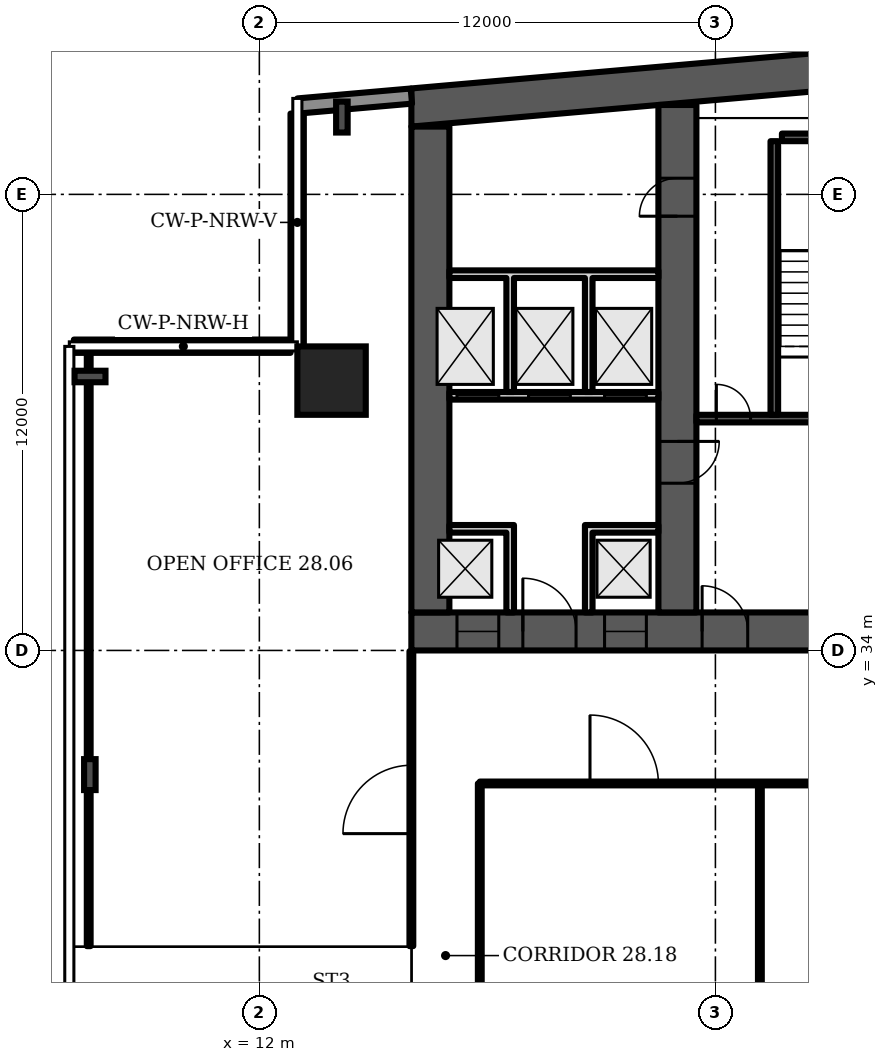
"""IFC4 building model, lengths in metres.
Left out: names, types, materials, properties, quantities, classifications, styles, units other than length and angle.
Written with IfcOpenShell. Run it as: python <this file> out.ifc"""

import sys

from ifc_helpers import new_model, si_unit, direction, frame, frame_2d, origin, origin_2d, place, context, subcontext, project, spatial, polyline, rectangle, i_section, outline, extrude, element, fill, save


model = new_model("IFC4")
c1 = context("Model", 3, precision=1e-05, world=origin(), true_north=direction((0.0, 1.0)))
c2 = subcontext(c1, "Body", "Model", "MODEL_VIEW")
j1 = project(units=[si_unit("LENGTHUNIT", "METRE"), si_unit("PLANEANGLEUNIT", "RADIAN")], contexts=[c1])
p1 = place(None, origin())
s1 = spatial("IfcSite", under=j1, at=p1, CompositionType="ELEMENT")
p2 = place(p1, origin())
s2 = spatial("IfcBuilding", under=s1, at=p2, CompositionType="ELEMENT")
p3 = place(p2, frame((0.0, 0.0, 121.9)))
s3 = spatial("IfcBuildingStorey", under=s2, at=p3, CompositionType="ELEMENT", Elevation=121.9)
p4 = place(p3, origin())
e1 = element("IfcWall", 1, at=p4, inside=s3, PredefinedType="SHEAR", context=c2, shape_type="SweptSolid", body=[
    extrude(outline(polyline([(16.0, 47.784), (40.5, 49.927), (65.0, 47.784), (65.0, 48.787), (40.5, 50.931), (16.0, 48.787), (16.0, 47.784)])), origin(), (0.0, 0.0, 1.0), 3.6),
])
p5 = place(p3, frame((16.0, 34.5, 0.0), z_axis=(0.0, 0.0, 1.0), x_axis=(1.0, 0.0, 0.0)))
e2 = element("IfcWall", 2, at=p5, inside=s3, PredefinedType="SHEAR", context=c2, shape_type="SweptSolid", body=[
    extrude(rectangle(XDim=49.0, YDim=1.0, at=frame_2d((24.5, 0.0))), origin(), (0.0, 0.0, 1.0), 3.6),
])
p6 = place(p5, frame((1.2, 0.0, 0.0)))
e3 = element("IfcOpeningElement", 3, at=p6, cuts=e2, PredefinedType="OPENING", context=c2, shape_type="SweptSolid", body=[
    extrude(rectangle(XDim=1.1, YDim=2.1, at=frame_2d((0.55, 1.05))), frame((0.0, 0.51, 0.0), z_axis=(0.0, -1.0, 0.0), x_axis=(1.0, 0.0, 0.0)), (0.0, 0.0, 1.0), 1.02),
])
p7 = place(p5, frame((5.083, 0.0, 0.0)))
e4 = element("IfcOpeningElement", 4, at=p7, cuts=e2, PredefinedType="OPENING", context=c2, shape_type="SweptSolid", body=[
    extrude(rectangle(XDim=1.1, YDim=2.1, at=frame_2d((0.55, 1.05))), frame((0.0, 0.51, 0.0), z_axis=(0.0, -1.0, 0.0), x_axis=(1.0, 0.0, 0.0)), (0.0, 0.0, 1.0), 1.02),
])
p8 = place(p5, frame((2.933, 0.0, 0.0)))
e5 = element("IfcOpeningElement", 5, at=p8, cuts=e2, PredefinedType="OPENING", context=c2, shape_type="SweptSolid", body=[
    extrude(rectangle(XDim=1.4, YDim=2.1, at=frame_2d((0.7, 1.05))), frame((0.0, 0.51, 0.0), z_axis=(0.0, -1.0, 0.0), x_axis=(1.0, 0.0, 0.0)), (0.0, 0.0, 1.0), 1.02),
])
p9 = place(p5, frame((7.65, 0.0, 0.0)))
e6 = element("IfcOpeningElement", 6, at=p9, cuts=e2, PredefinedType="OPENING", context=c2, shape_type="SweptSolid", body=[
    extrude(rectangle(XDim=1.2, YDim=2.1, at=frame_2d((0.6, 1.05))), frame((0.0, 0.51, 0.0), z_axis=(0.0, -1.0, 0.0), x_axis=(1.0, 0.0, 0.0)), (0.0, 0.0, 1.0), 1.02),
])
p10 = place(p5, frame((14.817, 0.0, 0.0)))
e7 = element("IfcOpeningElement", 7, at=p10, cuts=e2, PredefinedType="OPENING", context=c2, shape_type="SweptSolid", body=[
    extrude(rectangle(XDim=1.1, YDim=2.1, at=frame_2d((0.55, 1.05))), frame((0.0, 0.51, 0.0), z_axis=(0.0, -1.0, 0.0), x_axis=(1.0, 0.0, 0.0)), (0.0, 0.0, 1.0), 1.02),
])
p11 = place(p5, frame((19.083, 0.0, 0.0)))
e8 = element("IfcOpeningElement", 8, at=p11, cuts=e2, PredefinedType="OPENING", context=c2, shape_type="SweptSolid", body=[
    extrude(rectangle(XDim=1.1, YDim=2.1, at=frame_2d((0.55, 1.05))), frame((0.0, 0.51, 0.0), z_axis=(0.0, -1.0, 0.0), x_axis=(1.0, 0.0, 0.0)), (0.0, 0.0, 1.0), 1.02),
])
p12 = place(p5, frame((16.8, 0.0, 0.0)))
e9 = element("IfcOpeningElement", 9, at=p12, cuts=e2, PredefinedType="OPENING", context=c2, shape_type="SweptSolid", body=[
    extrude(rectangle(XDim=1.4, YDim=2.1, at=frame_2d((0.7, 1.05))), frame((0.0, 0.51, 0.0), z_axis=(0.0, -1.0, 0.0), x_axis=(1.0, 0.0, 0.0)), (0.0, 0.0, 1.0), 1.02),
])
p13 = place(p5, frame((21.817, 0.0, 0.0)))
e10 = element("IfcOpeningElement", 10, at=p13, cuts=e2, PredefinedType="OPENING", context=c2, shape_type="SweptSolid", body=[
    extrude(rectangle(XDim=1.1, YDim=2.1, at=frame_2d((0.55, 1.05))), frame((0.0, 0.51, 0.0), z_axis=(0.0, -1.0, 0.0), x_axis=(1.0, 0.0, 0.0)), (0.0, 0.0, 1.0), 1.02),
])
p14 = place(p5, frame((26.083, 0.0, 0.0)))
e11 = element("IfcOpeningElement", 11, at=p14, cuts=e2, PredefinedType="OPENING", context=c2, shape_type="SweptSolid", body=[
    extrude(rectangle(XDim=1.1, YDim=2.1, at=frame_2d((0.55, 1.05))), frame((0.0, 0.51, 0.0), z_axis=(0.0, -1.0, 0.0), x_axis=(1.0, 0.0, 0.0)), (0.0, 0.0, 1.0), 1.02),
])
p15 = place(p5, frame((33.15, 0.0, 0.0)))
e12 = element("IfcOpeningElement", 12, at=p15, cuts=e2, PredefinedType="OPENING", context=c2, shape_type="SweptSolid", body=[
    extrude(rectangle(XDim=1.2, YDim=2.1, at=frame_2d((0.6, 1.05))), frame((0.0, 0.51, 0.0), z_axis=(0.0, -1.0, 0.0), x_axis=(1.0, 0.0, 0.0)), (0.0, 0.0, 1.0), 1.02),
])
p16 = place(p5, frame((37.8, 0.0, 0.0)))
e13 = element("IfcOpeningElement", 13, at=p16, cuts=e2, PredefinedType="OPENING", context=c2, shape_type="SweptSolid", body=[
    extrude(rectangle(XDim=1.4, YDim=2.1, at=frame_2d((0.7, 1.05))), frame((0.0, 0.51, 0.0), z_axis=(0.0, -1.0, 0.0), x_axis=(1.0, 0.0, 0.0)), (0.0, 0.0, 1.0), 1.02),
])
p17 = place(p5, frame((42.817, 0.0, 0.0)))
e14 = element("IfcOpeningElement", 14, at=p17, cuts=e2, PredefinedType="OPENING", context=c2, shape_type="SweptSolid", body=[
    extrude(rectangle(XDim=1.1, YDim=2.1, at=frame_2d((0.55, 1.05))), frame((0.0, 0.51, 0.0), z_axis=(0.0, -1.0, 0.0), x_axis=(1.0, 0.0, 0.0)), (0.0, 0.0, 1.0), 1.02),
])
p18 = place(p5, frame((46.7, 0.0, 0.0)))
e15 = element("IfcOpeningElement", 15, at=p18, cuts=e2, PredefinedType="OPENING", context=c2, shape_type="SweptSolid", body=[
    extrude(rectangle(XDim=1.1, YDim=2.1, at=frame_2d((0.55, 1.05))), frame((0.0, 0.51, 0.0), z_axis=(0.0, -1.0, 0.0), x_axis=(1.0, 0.0, 0.0)), (0.0, 0.0, 1.0), 1.02),
])
p19 = place(p5, frame((44.667, 0.0, 0.0)))
e16 = element("IfcOpeningElement", 16, at=p19, cuts=e2, PredefinedType="OPENING", context=c2, shape_type="SweptSolid", body=[
    extrude(rectangle(XDim=1.4, YDim=2.1, at=frame_2d((0.7, 1.05))), frame((0.0, 0.51, 0.0), z_axis=(0.0, -1.0, 0.0), x_axis=(1.0, 0.0, 0.0)), (0.0, 0.0, 1.0), 1.02),
])
p20 = place(p3, frame((16.5, 35.0, 0.0), z_axis=(0.0, 0.0, 1.0), x_axis=(0.0, 1.0, 0.0)))
e17 = element("IfcWall", 17, at=p20, inside=s3, PredefinedType="SHEAR", context=c2, shape_type="SweptSolid", body=[
    extrude(rectangle(XDim=12.784, YDim=1.0, at=frame_2d((6.392, 0.0))), origin(), (0.0, 0.0, 1.0), 3.6),
])
p21 = place(p3, frame((23.0, 35.0, 0.0), z_axis=(0.0, 0.0, 1.0), x_axis=(0.0, 1.0, 0.0)))
e18 = element("IfcWall", 18, at=p21, inside=s3, PredefinedType="SHEAR", context=c2, shape_type="SweptSolid", body=[
    extrude(rectangle(XDim=13.352, YDim=1.0, at=frame_2d((6.676, 0.0))), origin(), (0.0, 0.0, 1.0), 3.6),
])
p22 = place(p21, frame((10.426, 0.0, 0.0)))
e19 = element("IfcOpeningElement", 19, at=p22, cuts=e18, PredefinedType="OPENING", context=c2, shape_type="SweptSolid", body=[
    extrude(rectangle(XDim=1.0, YDim=2.1, at=frame_2d((0.5, 1.05))), frame((0.0, 0.51, 0.0), z_axis=(0.0, -1.0, 0.0), x_axis=(1.0, 0.0, 0.0)), (0.0, 0.0, 1.0), 1.02),
])
p23 = place(p21, frame((3.4, 0.0, 0.0)))
e20 = element("IfcOpeningElement", 20, at=p23, cuts=e18, PredefinedType="OPENING", context=c2, shape_type="SweptSolid", body=[
    extrude(rectangle(XDim=1.1, YDim=2.1, at=frame_2d((0.55, 1.05))), frame((0.0, 0.51, 0.0), z_axis=(0.0, -1.0, 0.0), x_axis=(1.0, 0.0, 0.0)), (0.0, 0.0, 1.0), 1.02),
])
p24 = place(p3, frame((13.9, 41.1, 0.0), z_axis=(0.0, 0.0, 1.0), x_axis=(1.0, 0.0, 0.0)))
e21 = element("IfcColumn", 21, at=p24, inside=s3, PredefinedType="COLUMN", context=c2, shape_type="SweptSolid", body=[
    extrude(rectangle(XDim=1.8, YDim=1.8, at=origin_2d()), origin(), (0.0, 0.0, 1.0), 3.6),
])
for number, where, z_axis, x_axis in (
    (22, (14.172, 48.034, 0.0), (0.0, 0.0, 1.0), (-1.0, 0.0, 0.0)),
    (23, (7.544, 41.208, 0.0), (0.0, 0.0, 1.0), (0.0, 1.0, 0.0)),
    (24, (7.54, 30.733, 0.0), (0.0, 0.0, 1.0), (-1.0, 0.0, 0.0)),
):
    element("IfcColumn", number, at=place(p3, frame(where, z_axis=z_axis, x_axis=x_axis)), inside=s3, PredefinedType="COLUMN", context=c2, shape_type="SweptSolid", body=[
        extrude(i_section(OverallWidth=0.303, OverallDepth=0.814, WebThickness=0.021, FlangeThickness=0.04, FilletRadius=0.03, at=origin_2d()), origin(), (0.0, 0.0, 1.0), 3.6),
    ])
p25 = place(p3, frame((16.0, 48.587, 0.0), z_axis=(0.0, 0.0, 1.0), x_axis=(-0.996194, -0.087168, 0.0)))
e25 = element("IfcWall", 25, at=p25, inside=s3, PredefinedType="SOLIDWALL", context=c2, shape_type="SweptSolid", body=[
    extrude(rectangle(XDim=2.994, YDim=0.4, at=frame_2d((1.497, 0.0))), origin(), (0.0, 0.0, 1.0), 3.2),
])
p26 = place(p3, frame((12.995, 48.126, 0.0), z_axis=(0.0, 0.0, 1.0), x_axis=(0.0, -1.0, 0.0)))
e26 = element("IfcWall", 26, at=p26, inside=s3, PredefinedType="SOLIDWALL", context=c2, shape_type="SweptSolid", body=[
    extrude(rectangle(XDim=6.126, YDim=0.35, at=frame_2d((3.063, 0.0))), origin(), (0.0, 0.0, 1.0), 1.0),
])
p27 = place(p3, frame((12.82, 42.005, 0.0), z_axis=(0.0, 0.0, 1.0), x_axis=(-1.0, 0.0, 0.0)))
e27 = element("IfcWall", 27, at=p27, inside=s3, PredefinedType="SOLIDWALL", context=c2, shape_type="SweptSolid", body=[
    extrude(rectangle(XDim=5.7, YDim=0.35, at=frame_2d((2.85, 0.0))), origin(), (0.0, 0.0, 1.0), 1.0),
])
p28 = place(p3, frame((17.0, 40.7, 0.0), z_axis=(0.0, 0.0, 1.0), x_axis=(1.0, 0.0, 0.0)))
e28 = element("IfcWall", 28, at=p28, inside=s3, PredefinedType="PARTITIONING", context=c2, shape_type="SweptSolid", body=[
    extrude(rectangle(XDim=5.5, YDim=0.2, at=frame_2d((2.75, 0.0))), origin(), (0.0, 0.0, 1.0), 3.2),
])
p29 = place(p28, frame((0.2, 0.0, 0.0)))
e29 = element("IfcOpeningElement", 29, at=p29, cuts=e28, PredefinedType="OPENING", context=c2, shape_type="SweptSolid", body=[
    extrude(rectangle(XDim=1.1, YDim=2.1, at=frame_2d((0.55, 1.05))), frame((0.0, 0.11, 0.0), z_axis=(0.0, -1.0, 0.0), x_axis=(1.0, 0.0, 0.0)), (0.0, 0.0, 1.0), 0.22),
])
p30 = place(p28, frame((2.083, 0.0, 0.0)))
e30 = element("IfcOpeningElement", 30, at=p30, cuts=e28, PredefinedType="OPENING", context=c2, shape_type="SweptSolid", body=[
    extrude(rectangle(XDim=1.1, YDim=2.1, at=frame_2d((0.55, 1.05))), frame((0.0, 0.11, 0.0), z_axis=(0.0, -1.0, 0.0), x_axis=(1.0, 0.0, 0.0)), (0.0, 0.0, 1.0), 0.22),
])
p31 = place(p28, frame((4.083, 0.0, 0.0)))
e31 = element("IfcOpeningElement", 31, at=p31, cuts=e28, PredefinedType="OPENING", context=c2, shape_type="SweptSolid", body=[
    extrude(rectangle(XDim=1.1, YDim=2.1, at=frame_2d((0.55, 1.05))), frame((0.0, 0.11, 0.0), z_axis=(0.0, -1.0, 0.0), x_axis=(1.0, 0.0, 0.0)), (0.0, 0.0, 1.0), 0.22),
])
p32 = place(p3, origin())
e32 = element("IfcWall", 32, at=p32, inside=s3, PredefinedType="PARTITIONING", context=c2, shape_type="SweptSolid", body=[
    extrude(outline(polyline([(18.5, 37.1), (17.0, 37.1), (17.0, 37.3), (18.5, 37.3), (18.7, 37.3), (18.7, 35.0), (18.5, 35.0), (18.5, 37.1)])), origin(), (0.0, 0.0, 1.0), 3.2),
])
p33 = place(p3, origin())
e33 = element("IfcWall", 33, at=p33, inside=s3, PredefinedType="PARTITIONING", context=c2, shape_type="SweptSolid", body=[
    extrude(outline(polyline([(20.567, 37.3), (20.767, 37.3), (22.5, 37.3), (22.5, 37.1), (20.767, 37.1), (20.767, 35.0), (20.567, 35.0), (20.567, 37.3)])), origin(), (0.0, 0.0, 1.0), 3.2),
])
p34 = place(p3, origin())
e34 = element("IfcWall", 34, at=p34, inside=s3, PredefinedType="PARTITIONING", context=c2, shape_type="SweptSolid", body=[
    extrude(outline(polyline([(18.7, 40.8), (18.5, 40.8), (18.5, 43.8), (17.0, 43.8), (17.0, 44.0), (22.5, 44.0), (22.5, 43.8), (20.767, 43.8), (20.767, 40.8), (20.567, 40.8), (20.567, 43.8), (18.7, 43.8), (18.7, 40.8)])), origin(), (0.0, 0.0, 1.0), 3.2),
])
p35 = place(p3, frame((23.5, 40.1, 0.0), z_axis=(0.0, 0.0, 1.0), x_axis=(1.0, 0.0, 0.0)))
e35 = element("IfcWall", 35, at=p35, inside=s3, PredefinedType="SHEAR", context=c2, shape_type="SweptSolid", body=[
    extrude(rectangle(XDim=6.0, YDim=0.2, at=frame_2d((3.0, 0.0))), origin(), (0.0, 0.0, 1.0), 3.2),
])
p36 = place(p35, frame((3.425, 0.0, 0.0)))
e36 = element("IfcOpeningElement", 36, at=p36, cuts=e35, PredefinedType="OPENING", context=c2, shape_type="SweptSolid", body=[
    extrude(rectangle(XDim=1.2, YDim=2.1, at=frame_2d((0.6, 1.05))), frame((0.0, 0.11, 0.0), z_axis=(0.0, -1.0, 0.0), x_axis=(1.0, 0.0, 0.0)), (0.0, 0.0, 1.0), 0.22),
])
p37 = place(p35, frame((0.525, 0.0, 0.0)))
e37 = element("IfcOpeningElement", 37, at=p37, cuts=e35, PredefinedType="OPENING", context=c2, shape_type="SweptSolid", body=[
    extrude(rectangle(XDim=0.9, YDim=2.1, at=frame_2d((0.45, 1.05))), frame((0.0, 0.11, 0.0), z_axis=(0.0, -1.0, 0.0), x_axis=(1.0, 0.0, 0.0)), (0.0, 0.0, 1.0), 0.22),
])
p38 = place(p3, frame((25.55, 40.2, 0.0), z_axis=(0.0, 0.0, 1.0), x_axis=(0.0, 1.0, 0.0)))
e38 = element("IfcWall", 38, at=p38, inside=s3, PredefinedType="SHEAR", context=c2, shape_type="SweptSolid", body=[
    extrude(rectangle(XDim=7.2, YDim=0.2, at=frame_2d((3.6, 0.0))), origin(), (0.0, 0.0, 1.0), 3.2),
])
p39 = place(p3, frame((25.75, 47.5, 0.0), z_axis=(0.0, 0.0, 1.0), x_axis=(1.0, 0.0, 0.0)))
e39 = element("IfcWall", 39, at=p39, inside=s3, PredefinedType="SHEAR", context=c2, shape_type="SweptSolid", body=[
    extrude(rectangle(XDim=3.75, YDim=0.2, at=frame_2d((1.875, 0.0))), origin(), (0.0, 0.0, 1.0), 3.2),
])
p40 = place(p3, frame((7.51, 26.22, 0.0), z_axis=(0.0, 0.0, 1.0), x_axis=(0.0, 1.0, 0.0)))
e40 = element("IfcWall", 40, at=p40, inside=s3, PredefinedType="PARTITIONING", context=c2, shape_type="SweptSolid", body=[
    extrude(rectangle(XDim=15.76, YDim=0.1, at=frame_2d((7.88, 0.0))), origin(), (0.0, 0.0, 1.0), 2.58),
])
p41 = place(p3, frame((16.0, 26.22, 0.0), z_axis=(0.0, 0.0, 1.0), x_axis=(0.0, 1.0, 0.0)))
e41 = element("IfcWall", 41, at=p41, inside=s3, PredefinedType="PARTITIONING", context=c2, shape_type="SweptSolid", body=[
    extrude(rectangle(XDim=7.76, YDim=0.1, at=frame_2d((3.88, 0.0))), origin(), (0.0, 0.0, 1.0), 3.2),
])
p42 = place(p41, frame((2.96, 0.0, 0.0)))
e42 = element("IfcOpeningElement", 42, at=p42, cuts=e41, PredefinedType="OPENING", context=c2, shape_type="SweptSolid", body=[
    extrude(rectangle(XDim=1.8, YDim=2.1, at=frame_2d((0.9, 1.05))), frame((0.0, 0.06, 0.0), z_axis=(0.0, -1.0, 0.0), x_axis=(1.0, 0.0, 0.0)), (0.0, 0.0, 1.0), 0.12),
])
p43 = place(p3, frame((17.8, 21.8, 0.0), z_axis=(0.0, 0.0, 1.0), x_axis=(0.0, 1.0, 0.0)))
e43 = element("IfcWall", 43, at=p43, inside=s3, PredefinedType="PARTITIONING", context=c2, shape_type="SweptSolid", body=[
    extrude(rectangle(XDim=8.7, YDim=0.1, at=frame_2d((4.35, 0.0))), origin(), (0.0, 0.0, 1.0), 3.2),
])
p44 = place(p3, frame((17.8, 30.5, 0.0), z_axis=(0.0, 0.0, 1.0), x_axis=(1.0, 0.0, 0.0)))
e44 = element("IfcWall", 44, at=p44, inside=s3, PredefinedType="PARTITIONING", context=c2, shape_type="SweptSolid", body=[
    extrude(rectangle(XDim=19.05, YDim=0.1, at=frame_2d((9.525, 0.0))), origin(), (0.0, 0.0, 1.0), 3.2),
])
p45 = place(p44, frame((2.9, 0.0, 0.0)))
e45 = element("IfcOpeningElement", 45, at=p45, cuts=e44, PredefinedType="OPENING", context=c2, shape_type="SweptSolid", body=[
    extrude(rectangle(XDim=1.8, YDim=2.1, at=frame_2d((0.9, 1.05))), frame((0.0, 0.06, 0.0), z_axis=(0.0, -1.0, 0.0), x_axis=(1.0, 0.0, 0.0)), (0.0, 0.0, 1.0), 0.12),
])
p46 = place(p44, frame((9.99, 0.0, 0.0)))
e46 = element("IfcOpeningElement", 46, at=p46, cuts=e44, PredefinedType="OPENING", context=c2, shape_type="SweptSolid", body=[
    extrude(rectangle(XDim=1.0, YDim=2.1, at=frame_2d((0.5, 1.05))), frame((0.0, 0.06, 0.0), z_axis=(0.0, -1.0, 0.0), x_axis=(1.0, 0.0, 0.0)), (0.0, 0.0, 1.0), 0.12),
])
p47 = place(p44, frame((15.75, 0.0, 0.0)))
e47 = element("IfcOpeningElement", 47, at=p47, cuts=e44, PredefinedType="OPENING", context=c2, shape_type="SweptSolid", body=[
    extrude(rectangle(XDim=1.0, YDim=2.1, at=frame_2d((0.5, 1.05))), frame((0.0, 0.06, 0.0), z_axis=(0.0, -1.0, 0.0), x_axis=(1.0, 0.0, 0.0)), (0.0, 0.0, 1.0), 0.12),
])
p48 = place(p3, frame((25.17, 1.12, 0.0), z_axis=(0.0, 0.0, 1.0), x_axis=(0.0, 1.0, 0.0)))
e48 = element("IfcWall", 48, at=p48, inside=s3, PredefinedType="PARTITIONING", context=c2, shape_type="SweptSolid", body=[
    extrude(rectangle(XDim=29.38, YDim=0.1, at=frame_2d((14.69, 0.0))), origin(), (0.0, 0.0, 1.0), 3.2),
])
p49 = place(p6, origin())
e49 = element("IfcDoor", 49, at=p49, inside=s3, OperationType="DOUBLE_DOOR_SLIDING", PredefinedType="DOOR", context=c2, shape_type="SweptSolid", body=[
    extrude(rectangle(XDim=1.1, YDim=2.1, at=frame_2d((0.55, 1.05))), frame((0.0, 0.025, 0.0), z_axis=(0.0, -1.0, 0.0), x_axis=(1.0, 0.0, 0.0)), (0.0, 0.0, 1.0), 0.05),
])
fill(e3, e49)
p50 = place(p7, origin())
e50 = element("IfcDoor", 50, at=p50, inside=s3, OperationType="DOUBLE_DOOR_SLIDING", PredefinedType="DOOR", context=c2, shape_type="SweptSolid", body=[
    extrude(rectangle(XDim=1.1, YDim=2.1, at=frame_2d((0.55, 1.05))), frame((0.0, 0.025, 0.0), z_axis=(0.0, -1.0, 0.0), x_axis=(1.0, 0.0, 0.0)), (0.0, 0.0, 1.0), 0.05),
])
fill(e4, e50)
p51 = place(p8, origin())
e51 = element("IfcDoor", 51, at=p51, inside=s3, OperationType="DOUBLE_DOOR_SINGLE_SWING", PredefinedType="DOOR", context=c2, shape_type="SweptSolid", body=[
    extrude(rectangle(XDim=1.4, YDim=2.1, at=frame_2d((0.7, 1.05))), frame((0.0, 0.025, 0.0), z_axis=(0.0, -1.0, 0.0), x_axis=(1.0, 0.0, 0.0)), (0.0, 0.0, 1.0), 0.05),
])
fill(e5, e51)
p52 = place(p29, origin())
e52 = element("IfcDoor", 52, at=p52, inside=s3, OperationType="DOUBLE_DOOR_SLIDING", PredefinedType="DOOR", context=c2, shape_type="SweptSolid", body=[
    extrude(rectangle(XDim=1.1, YDim=2.1, at=frame_2d((0.55, 1.05))), frame((0.0, 0.025, 0.0), z_axis=(0.0, -1.0, 0.0), x_axis=(1.0, 0.0, 0.0)), (0.0, 0.0, 1.0), 0.05),
])
fill(e29, e52)
p53 = place(p30, origin())
e53 = element("IfcDoor", 53, at=p53, inside=s3, OperationType="DOUBLE_DOOR_SLIDING", PredefinedType="DOOR", context=c2, shape_type="SweptSolid", body=[
    extrude(rectangle(XDim=1.1, YDim=2.1, at=frame_2d((0.55, 1.05))), frame((0.0, 0.025, 0.0), z_axis=(0.0, -1.0, 0.0), x_axis=(1.0, 0.0, 0.0)), (0.0, 0.0, 1.0), 0.05),
])
fill(e30, e53)
p54 = place(p31, origin())
e54 = element("IfcDoor", 54, at=p54, inside=s3, OperationType="DOUBLE_DOOR_SLIDING", PredefinedType="DOOR", context=c2, shape_type="SweptSolid", body=[
    extrude(rectangle(XDim=1.1, YDim=2.1, at=frame_2d((0.55, 1.05))), frame((0.0, 0.025, 0.0), z_axis=(0.0, -1.0, 0.0), x_axis=(1.0, 0.0, 0.0)), (0.0, 0.0, 1.0), 0.05),
])
fill(e31, e54)
p55 = place(p22, origin())
e55 = element("IfcDoor", 55, at=p55, inside=s3, OperationType="SINGLE_SWING_LEFT", PredefinedType="DOOR", context=c2, shape_type="SweptSolid", body=[
    extrude(rectangle(XDim=1.0, YDim=2.1, at=frame_2d((0.5, 1.05))), frame((0.0, 0.5, 0.0), z_axis=(0.0, -1.0, 0.0), x_axis=(1.0, 0.0, 0.0)), (0.0, 0.0, 1.0), 1.0),
])
fill(e19, e55)
p56 = place(p37, origin())
e56 = element("IfcDoor", 56, at=p56, inside=s3, OperationType="SINGLE_SWING_LEFT", PredefinedType="DOOR", context=c2, shape_type="SweptSolid", body=[
    extrude(rectangle(XDim=0.9, YDim=2.1, at=frame_2d((0.45, 1.05))), frame((0.0, 0.025, 0.0), z_axis=(0.0, -1.0, 0.0), x_axis=(1.0, 0.0, 0.0)), (0.0, 0.0, 1.0), 0.05),
])
fill(e37, e56)
p57 = place(p9, origin())
e57 = element("IfcDoor", 57, at=p57, inside=s3, OperationType="SINGLE_SWING_LEFT", PredefinedType="DOOR", context=c2, shape_type="SweptSolid", body=[
    extrude(rectangle(XDim=1.2, YDim=2.1, at=frame_2d((0.6, 1.05))), frame((0.0, 0.025, 0.0), z_axis=(0.0, -1.0, 0.0), x_axis=(1.0, 0.0, 0.0)), (0.0, 0.0, 1.0), 0.05),
])
fill(e6, e57)
p58 = place(p23, origin())
e58 = element("IfcDoor", 58, at=p58, inside=s3, OperationType="SINGLE_SWING_RIGHT", PredefinedType="DOOR", context=c2, shape_type="SweptSolid", body=[
    extrude(rectangle(XDim=1.1, YDim=2.1, at=frame_2d((0.55, 1.05))), frame((0.0, 0.025, 0.0), z_axis=(0.0, -1.0, 0.0), x_axis=(1.0, 0.0, 0.0)), (0.0, 0.0, 1.0), 0.05),
])
fill(e20, e58)
p59 = place(p42, origin())
e59 = element("IfcDoor", 59, at=p59, inside=s3, OperationType="DOUBLE_DOOR_SINGLE_SWING", PredefinedType="DOOR", context=c2, shape_type="SweptSolid", body=[
    extrude(rectangle(XDim=1.8, YDim=2.1, at=frame_2d((0.9, 1.05))), frame((0.0, 0.025, 0.0), z_axis=(0.0, -1.0, 0.0), x_axis=(1.0, 0.0, 0.0)), (0.0, 0.0, 1.0), 0.05),
])
fill(e42, e59)
p60 = place(p45, origin())
e60 = element("IfcDoor", 60, at=p60, inside=s3, OperationType="DOUBLE_DOOR_SINGLE_SWING", PredefinedType="DOOR", context=c2, shape_type="SweptSolid", body=[
    extrude(rectangle(XDim=1.8, YDim=2.1, at=frame_2d((0.9, 1.05))), frame((0.0, 0.025, 0.0), z_axis=(0.0, -1.0, 0.0), x_axis=(1.0, 0.0, 0.0)), (0.0, 0.0, 1.0), 0.05),
])
fill(e45, e60)
save(model, sys.argv[1])
